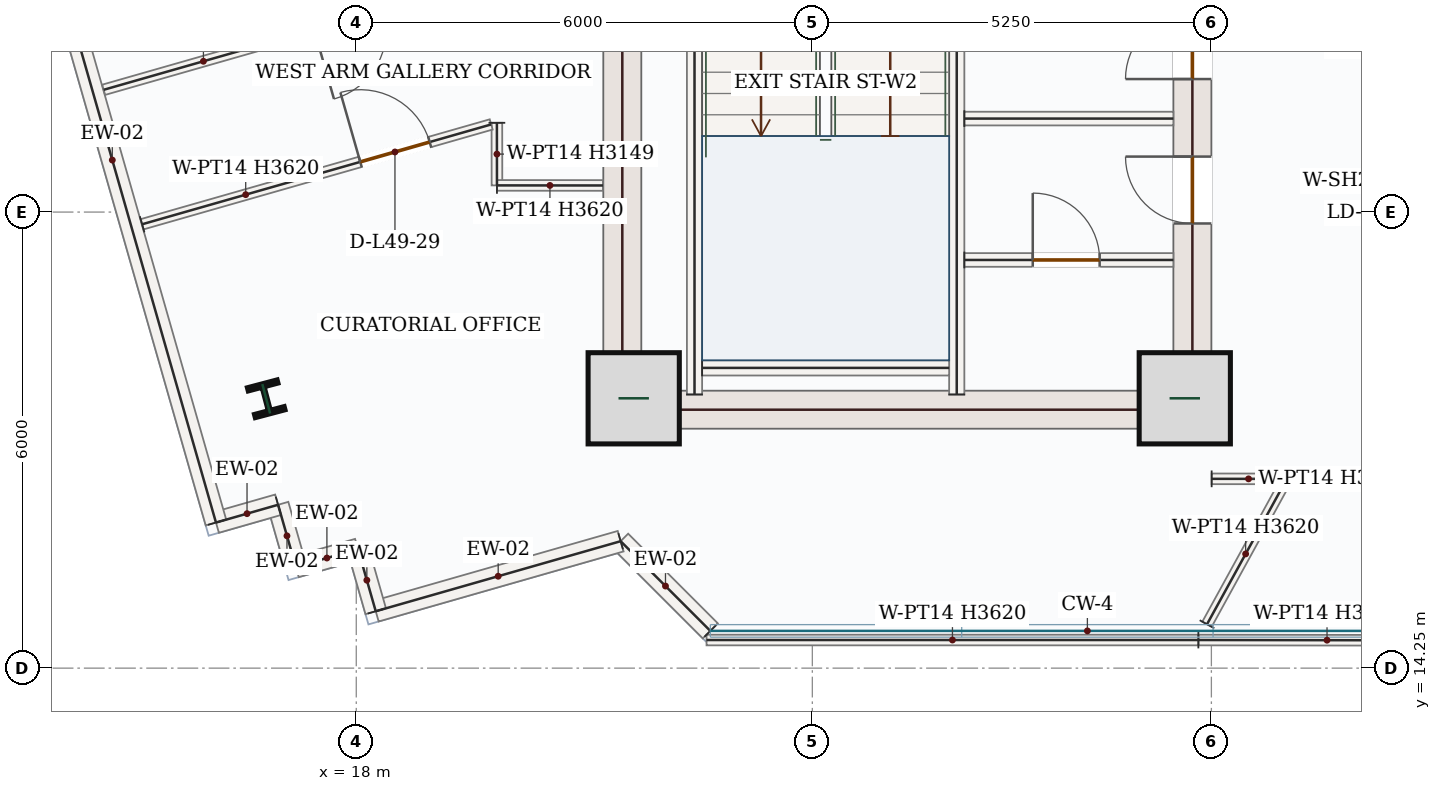
"""IFC4 building model, lengths in metres.
Left out: names, types, materials, properties, quantities, classifications, styles, units other than length and angle.
Written with IfcOpenShell. Run it as: python <this file> out.ifc"""

import sys

from ifc_helpers import new_model, si_unit, direction, frame, frame_2d, origin, origin_2d, place, context, subcontext, project, spatial, rectangle, i_section, extrude, source, transform, mapped, element, fill, save


model = new_model("IFC4")
c1 = context("Model", 3, precision=1e-05, world=origin(), true_north=direction((0.0, 1.0)))
c2 = subcontext(c1, "Body", "Model", "MODEL_VIEW")
j1 = project(units=[si_unit("LENGTHUNIT", "METRE"), si_unit("PLANEANGLEUNIT", "RADIAN")], contexts=[c1])
p1 = place(None, origin())
s1 = spatial("IfcSite", under=j1, at=p1, CompositionType="ELEMENT")
p2 = place(p1, origin())
s2 = spatial("IfcBuilding", under=s1, at=p2, CompositionType="ELEMENT")
p3 = place(p2, frame((0.0, 0.0, 209.7)))
s3 = spatial("IfcBuildingStorey", under=s2, at=p3, CompositionType="ELEMENT", Elevation=209.7)
m1 = source(origin(), c2, "Body", "SweptSolid", [
    extrude(rectangle(XDim=8.55, YDim=0.5, at=frame_2d((4.275, 0.0))), origin(), (0.0, 0.0, 1.0), 3.62),
])
p4 = place(p3, frame((21.5, 17.4, 0.0), z_axis=(0.0, 0.0, 1.0), x_axis=(0.0, 1.0, 0.0)))
e1 = element("IfcWall", 1, at=p4, inside=s3, PredefinedType="SHEAR", context=c2, shape_type="MappedRepresentation", body=[
    mapped(m1, transform((0.0, 0.0, 0.0), x_axis=(1.0, 0.0, 0.0), y_axis=(0.0, 1.0, 0.0), z_axis=(0.0, 0.0, 1.0), scale=1.0)),
])
p5 = place(p3, frame((29.0, 17.4, 0.0), z_axis=(0.0, 0.0, 1.0), x_axis=(0.0, 1.0, 0.0)))
e2 = element("IfcWall", 2, at=p5, inside=s3, PredefinedType="SHEAR", context=c2, shape_type="SweptSolid", body=[
    extrude(rectangle(XDim=8.55, YDim=0.5, at=frame_2d((4.275, 0.0))), origin(), (0.0, 0.0, 1.0), 3.62),
])
p6 = place(p5, frame((6.65, 0.0, 0.0)))
e3 = element("IfcOpeningElement", 3, at=p6, cuts=e2, PredefinedType="OPENING", context=c2, shape_type="SweptSolid", body=[
    extrude(rectangle(XDim=1.1, YDim=2.2, at=frame_2d((0.55, 1.1))), frame((0.0, 0.26, 0.0), z_axis=(0.0, -1.0, 0.0), x_axis=(1.0, 0.0, 0.0)), (0.0, 0.0, 1.0), 0.52),
])
p7 = place(p5, frame((2.7, 0.0, 0.0)))
e4 = element("IfcOpeningElement", 4, at=p7, cuts=e2, PredefinedType="OPENING", context=c2, shape_type="SweptSolid", body=[
    extrude(rectangle(XDim=0.88, YDim=2.1, at=frame_2d((0.44, 1.05))), frame((0.0, 0.26, 0.0), z_axis=(0.0, -1.0, 0.0), x_axis=(1.0, 0.0, 0.0)), (0.0, 0.0, 1.0), 0.52),
])
p8 = place(p5, frame((4.6, 0.0, 0.0)))
e5 = element("IfcOpeningElement", 5, at=p8, cuts=e2, PredefinedType="OPENING", context=c2, shape_type="SweptSolid", body=[
    extrude(rectangle(XDim=0.88, YDim=2.1, at=frame_2d((0.44, 1.05))), frame((0.0, 0.26, 0.0), z_axis=(0.0, -1.0, 0.0), x_axis=(1.0, 0.0, 0.0)), (0.0, 0.0, 1.0), 0.52),
])
m2 = source(origin(), c2, "Body", "SweptSolid", [
    extrude(rectangle(XDim=7.0, YDim=0.5, at=frame_2d((3.5, 0.0))), origin(), (0.0, 0.0, 1.0), 3.62),
])
p9 = place(p3, frame((21.75, 17.65, 0.0), z_axis=(0.0, 0.0, 1.0), x_axis=(1.0, 0.0, 0.0)))
e6 = element("IfcWall", 6, at=p9, inside=s3, PredefinedType="SHEAR", context=c2, shape_type="MappedRepresentation", body=[
    mapped(m2, transform((0.0, 0.0, 0.0), x_axis=(1.0, 0.0, 0.0), y_axis=(0.0, 1.0, 0.0), z_axis=(0.0, 0.0, 1.0), scale=1.0)),
])
m3 = source(origin(), c2, "Body", "SweptSolid", [
    extrude(rectangle(XDim=1.2, YDim=1.2, at=origin_2d()), origin(), (0.0, 0.0, 1.0), 3.9),
])
for number, where, z_axis, x_axis in (
    (7, (21.65, 17.8, 0.0), (0.0, 0.0, 1.0), (1.0, 0.0, 0.0)),
    (8, (28.9, 17.8, 0.0), (0.0, 0.0, 1.0), (1.0, 0.0, 0.0)),
):
    element("IfcColumn", number, at=place(p3, frame(where, z_axis=z_axis, x_axis=x_axis)), inside=s3, PredefinedType="COLUMN", context=c2, shape_type="MappedRepresentation", body=[
        mapped(m3, transform((0.0, 0.0, 0.0), x_axis=(1.0, 0.0, 0.0), y_axis=(0.0, 1.0, 0.0), z_axis=(0.0, 0.0, 1.0), scale=1.0)),
    ])
m4 = source(origin(), c2, "Body", "SweptSolid", [
    extrude(i_section(OverallWidth=0.404, OverallDepth=0.407, WebThickness=0.027, FlangeThickness=0.044, FilletRadius=0.018, at=origin_2d()), origin(), (0.0, 0.0, 1.0), 3.9),
])
p10 = place(p3, frame((16.815, 17.794, 0.0), z_axis=(0.0, 0.0, 1.0), x_axis=(0.966823388604, 0.255445757936, 0.0)))
e9 = element("IfcColumn", 9, at=p10, inside=s3, PredefinedType="COLUMN", context=c2, shape_type="MappedRepresentation", body=[
    mapped(m4, transform((0.0, 0.0, 0.0), x_axis=(1.0, 0.0, 0.0), y_axis=(0.0, 1.0, 0.0), z_axis=(0.0, 0.0, 1.0), scale=1.0)),
])
m5 = source(origin(), c2, "Body", "SweptSolid", [
    extrude(rectangle(XDim=1.669, YDim=0.28, at=frame_2d((0.834, 0.0))), origin(), (0.0, 0.0, 1.0), 3.62),
])
p11 = place(p3, frame((22.658, 14.74, 0.0), z_axis=(0.0, 0.0, 1.0), x_axis=(-0.707106781187, 0.707106781187, 0.0)))
e10 = element("IfcWall", 10, at=p11, inside=s3, PredefinedType="SOLIDWALL", context=c2, shape_type="MappedRepresentation", body=[
    mapped(m5, transform((0.0, 0.0, 0.0), x_axis=(1.0, 0.0, 0.0), y_axis=(0.0, 1.0, 0.0), z_axis=(0.0, 0.0, 1.0), scale=1.0)),
])
m6 = source(origin(), c2, "Body", "SweptSolid", [
    extrude(rectangle(XDim=3.351, YDim=0.28, at=frame_2d((1.676, 0.0))), origin(), (0.0, 0.0, 1.0), 3.62),
])
p12 = place(p3, frame((21.478, 15.92, 0.0), z_axis=(0.0, 0.0, 1.0), x_axis=(-0.961438677319, -0.275019398869, 0.0)))
e11 = element("IfcWall", 11, at=p12, inside=s3, PredefinedType="SOLIDWALL", context=c2, shape_type="MappedRepresentation", body=[
    mapped(m6, transform((0.0, 0.0, 0.0), x_axis=(1.0, 0.0, 0.0), y_axis=(0.0, 1.0, 0.0), z_axis=(0.0, 0.0, 1.0), scale=1.0)),
])
m7 = source(origin(), c2, "Body", "SweptSolid", [
    extrude(rectangle(XDim=0.85, YDim=0.28, at=frame_2d((0.425, 0.0))), origin(), (0.0, 0.0, 1.0), 3.62),
])
p13 = place(p3, frame((18.256, 14.998, 0.0), z_axis=(0.0, 0.0, 1.0), x_axis=(-0.275100375961, 0.961415510144, 0.0)))
e12 = element("IfcWall", 12, at=p13, inside=s3, PredefinedType="SOLIDWALL", context=c2, shape_type="MappedRepresentation", body=[
    mapped(m7, transform((0.0, 0.0, 0.0), x_axis=(1.0, 0.0, 0.0), y_axis=(0.0, 1.0, 0.0), z_axis=(0.0, 0.0, 1.0), scale=1.0)),
])
m8 = source(origin(), c2, "Body", "SweptSolid", [
    extrude(rectangle(XDim=0.85, YDim=0.28, at=frame_2d((0.425, 0.0))), origin(), (0.0, 0.0, 1.0), 3.62),
])
p14 = place(p3, frame((18.022, 15.816, 0.0), z_axis=(0.0, 0.0, 1.0), x_axis=(-0.961393768724, -0.275176346112, 0.0)))
e13 = element("IfcWall", 13, at=p14, inside=s3, PredefinedType="SOLIDWALL", context=c2, shape_type="MappedRepresentation", body=[
    mapped(m8, transform((0.0, 0.0, 0.0), x_axis=(1.0, 0.0, 0.0), y_axis=(0.0, 1.0, 0.0), z_axis=(0.0, 0.0, 1.0), scale=1.0)),
])
p15 = place(p3, frame((17.205, 15.582, 0.0), z_axis=(0.0, 0.0, 1.0), x_axis=(-0.274834915789, 0.961491429532, 0.0)))
e14 = element("IfcWall", 14, at=p15, inside=s3, PredefinedType="SOLIDWALL", context=c2, shape_type="MappedRepresentation", body=[
    mapped(m7, transform((0.0, 0.0, 0.0), x_axis=(1.0, 0.0, 0.0), y_axis=(0.0, 1.0, 0.0), z_axis=(0.0, 0.0, 1.0), scale=1.0)),
])
p16 = place(p3, frame((16.971, 16.399, 0.0), z_axis=(0.0, 0.0, 1.0), x_axis=(-0.961393768724, -0.275176346112, 0.0)))
e15 = element("IfcWall", 15, at=p16, inside=s3, PredefinedType="SOLIDWALL", context=c2, shape_type="MappedRepresentation", body=[
    mapped(m8, transform((0.0, 0.0, 0.0), x_axis=(1.0, 0.0, 0.0), y_axis=(0.0, 1.0, 0.0), z_axis=(0.0, 0.0, 1.0), scale=1.0)),
])
m9 = source(origin(), c2, "Body", "SweptSolid", [
    extrude(rectangle(XDim=9.92, YDim=0.28, at=frame_2d((4.96, 0.0))), origin(), (0.0, 0.0, 1.0), 3.62),
])
p17 = place(p3, frame((16.154, 16.165, 0.0), z_axis=(0.0, 0.0, 1.0), x_axis=(-0.274971401171, 0.961452405758, 0.0)))
e16 = element("IfcWall", 16, at=p17, inside=s3, PredefinedType="SOLIDWALL", context=c2, shape_type="MappedRepresentation", body=[
    mapped(m9, transform((0.0, 0.0, 0.0), x_axis=(1.0, 0.0, 0.0), y_axis=(0.0, 1.0, 0.0), z_axis=(0.0, 0.0, 1.0), scale=1.0)),
])
m10 = source(origin(), c2, "Body", "SweptSolid", [
    extrude(rectangle(XDim=7.87, YDim=0.2, at=frame_2d((3.935, 0.0))), origin(), (0.0, 0.0, 1.0), 3.62),
])
p18 = place(p3, frame((22.45, 17.85, 0.0), z_axis=(0.0, 0.0, 1.0), x_axis=(0.0, 1.0, 0.0)))
e17 = element("IfcWall", 17, at=p18, inside=s3, PredefinedType="SOLIDWALL", context=c2, shape_type="MappedRepresentation", body=[
    mapped(m10, transform((0.0, 0.0, 0.0), x_axis=(1.0, 0.0, 0.0), y_axis=(0.0, 1.0, 0.0), z_axis=(0.0, 0.0, 1.0), scale=1.0)),
])
p19 = place(p3, frame((25.9, 17.85, 0.0), z_axis=(0.0, 0.0, 1.0), x_axis=(0.0, 1.0, 0.0)))
e18 = element("IfcWall", 18, at=p19, inside=s3, PredefinedType="SOLIDWALL", context=c2, shape_type="SweptSolid", body=[
    extrude(rectangle(XDim=8.0, YDim=0.2, at=frame_2d((4.0, 0.0))), origin(), (0.0, 0.0, 1.0), 3.62),
])
p20 = place(p19, frame((6.3, 0.0, 0.0)))
e19 = element("IfcOpeningElement", 19, at=p20, cuts=e18, PredefinedType="OPENING", context=c2, shape_type="SweptSolid", body=[
    extrude(rectangle(XDim=1.05, YDim=2.15, at=frame_2d((0.525, 1.075))), frame((0.0, 0.11, 0.0), z_axis=(0.0, -1.0, 0.0), x_axis=(1.0, 0.0, 0.0)), (0.0, 0.0, 1.0), 0.22),
])
m11 = source(origin(), c2, "Body", "SweptSolid", [
    extrude(rectangle(XDim=3.25, YDim=0.2, at=frame_2d((1.625, 0.0))), origin(), (0.0, 0.0, 1.0), 3.62),
])
p21 = place(p3, frame((22.55, 18.2, 0.0), z_axis=(0.0, 0.0, 1.0), x_axis=(1.0, 0.0, 0.0)))
e20 = element("IfcWall", 20, at=p21, inside=s3, PredefinedType="SOLIDWALL", context=c2, shape_type="MappedRepresentation", body=[
    mapped(m11, transform((0.0, 0.0, 0.0), x_axis=(1.0, 0.0, 0.0), y_axis=(0.0, 1.0, 0.0), z_axis=(0.0, 0.0, 1.0), scale=1.0)),
])
p22 = place(p3, frame((26.0, 19.62, 0.0), z_axis=(0.0, 0.0, 1.0), x_axis=(1.0, 0.0, 0.0)))
e21 = element("IfcWall", 21, at=p22, inside=s3, PredefinedType="PARTITIONING", context=c2, shape_type="SweptSolid", body=[
    extrude(rectangle(XDim=2.75, YDim=0.18, at=frame_2d((1.375, 0.0))), origin(), (0.0, 0.0, 1.0), 3.62),
])
p23 = place(p22, frame((0.9, 0.0, 0.0)))
e22 = element("IfcOpeningElement", 22, at=p23, cuts=e21, PredefinedType="OPENING", context=c2, shape_type="SweptSolid", body=[
    extrude(rectangle(XDim=0.88, YDim=2.1, at=frame_2d((0.44, 1.05))), frame((0.0, 0.1, 0.0), z_axis=(0.0, -1.0, 0.0), x_axis=(1.0, 0.0, 0.0)), (0.0, 0.0, 1.0), 0.2),
])
m12 = source(origin(), c2, "Body", "SweptSolid", [
    extrude(rectangle(XDim=2.75, YDim=0.18, at=frame_2d((1.375, 0.0))), origin(), (0.0, 0.0, 1.0), 3.62),
])
p24 = place(p3, frame((26.0, 21.48, 0.0), z_axis=(0.0, 0.0, 1.0), x_axis=(1.0, 0.0, 0.0)))
e23 = element("IfcWall", 23, at=p24, inside=s3, PredefinedType="PARTITIONING", context=c2, shape_type="MappedRepresentation", body=[
    mapped(m12, transform((0.0, 0.0, 0.0), x_axis=(1.0, 0.0, 0.0), y_axis=(0.0, 1.0, 0.0), z_axis=(0.0, 0.0, 1.0), scale=1.0)),
])
p25 = place(p3, frame((30.225, 16.74, 0.0), z_axis=(0.0, 0.0, 1.0), x_axis=(1.0, 0.0, 0.0)))
e24 = element("IfcWall", 24, at=p25, inside=s3, PredefinedType="PARTITIONING", context=c2, shape_type="SweptSolid", body=[
    extrude(rectangle(XDim=7.753, YDim=0.14, at=frame_2d((3.876, 0.0))), origin(), (0.0, 0.0, 1.0), 3.62),
])
p26 = place(p25, frame((5.306, 0.0, 0.0)))
e25 = element("IfcOpeningElement", 25, at=p26, cuts=e24, PredefinedType="OPENING", context=c2, shape_type="SweptSolid", body=[
    extrude(rectangle(XDim=0.95, YDim=2.15, at=frame_2d((0.475, 1.075))), frame((0.0, 0.08, 0.0), z_axis=(0.0, -1.0, 0.0), x_axis=(1.0, 0.0, 0.0)), (0.0, 0.0, 1.0), 0.16),
])
m13 = source(origin(), c2, "Body", "SweptSolid", [
    extrude(rectangle(XDim=3.385, YDim=0.14, at=frame_2d((1.693, 0.0))), origin(), (0.0, 0.0, 1.0), 3.62),
])
p27 = place(p3, frame((32.464, 14.615, 0.0), z_axis=(0.0, 0.0, 1.0), x_axis=(-0.999999061333, 0.001370158085, 0.0)))
e26 = element("IfcWall", 26, at=p27, inside=s3, PredefinedType="PARTITIONING", context=c2, shape_type="MappedRepresentation", body=[
    mapped(m13, transform((0.0, 0.0, 0.0), x_axis=(1.0, 0.0, 0.0), y_axis=(0.0, 1.0, 0.0), z_axis=(0.0, 0.0, 1.0), scale=1.0)),
])
m14 = source(origin(), c2, "Body", "SweptSolid", [
    extrude(rectangle(XDim=2.111, YDim=0.14, at=frame_2d((1.056, 0.0))), origin(), (0.0, 0.0, 1.0), 3.62),
])
p28 = place(p3, frame((29.193, 14.827, 0.0), z_axis=(0.0, 0.0, 1.0), x_axis=(0.481297142313, 0.876557505702, 0.0)))
e27 = element("IfcWall", 27, at=p28, inside=s3, PredefinedType="PARTITIONING", context=c2, shape_type="MappedRepresentation", body=[
    mapped(m14, transform((0.0, 0.0, 0.0), x_axis=(1.0, 0.0, 0.0), y_axis=(0.0, 1.0, 0.0), z_axis=(0.0, 0.0, 1.0), scale=1.0)),
])
p29 = place(p3, frame((19.85, 23.338, 0.0), z_axis=(0.0, 0.0, 1.0), x_axis=(-0.961455430103, -0.274960826164, 0.0)))
e28 = element("IfcWall", 28, at=p29, inside=s3, PredefinedType="PARTITIONING", context=c2, shape_type="SweptSolid", body=[
    extrude(rectangle(XDim=5.381, YDim=0.14, at=frame_2d((2.69, 0.0))), origin(), (0.0, 0.0, 1.0), 3.62),
])
p30 = place(p29, frame((1.551, 0.0, 0.0)))
e29 = element("IfcOpeningElement", 29, at=p30, cuts=e28, PredefinedType="OPENING", context=c2, shape_type="SweptSolid", body=[
    extrude(rectangle(XDim=0.95, YDim=2.15, at=frame_2d((0.475, 1.075))), frame((0.0, 0.08, 0.0), z_axis=(0.0, -1.0, 0.0), x_axis=(1.0, 0.0, 0.0)), (0.0, 0.0, 1.0), 0.16),
])
m15 = source(origin(), c2, "Body", "SweptSolid", [
    extrude(rectangle(XDim=0.823, YDim=0.14, at=frame_2d((0.412, 0.0))), origin(), (0.0, 0.0, 1.0), 3.149),
])
p31 = place(p3, frame((19.85, 21.424, 0.0), z_axis=(0.0, 0.0, 1.0), x_axis=(0.001186238786, -0.999999296419, 0.0)))
e30 = element("IfcWall", 30, at=p31, inside=s3, PredefinedType="PARTITIONING", context=c2, shape_type="MappedRepresentation", body=[
    mapped(m15, transform((0.0, 0.0, 0.0), x_axis=(1.0, 0.0, 0.0), y_axis=(0.0, 1.0, 0.0), z_axis=(0.0, 0.0, 1.0), scale=1.0)),
])
m16 = source(origin(), c2, "Body", "SweptSolid", [
    extrude(rectangle(XDim=1.394, YDim=0.14, at=frame_2d((0.697, 0.0))), origin(), (0.0, 0.0, 1.0), 3.62),
])
p32 = place(p3, frame((19.851, 20.601, 0.0), z_axis=(0.0, 0.0, 1.0), x_axis=(0.999999754632, -0.000700525222, 0.0)))
e31 = element("IfcWall", 31, at=p32, inside=s3, PredefinedType="PARTITIONING", context=c2, shape_type="MappedRepresentation", body=[
    mapped(m16, transform((0.0, 0.0, 0.0), x_axis=(1.0, 0.0, 0.0), y_axis=(0.0, 1.0, 0.0), z_axis=(0.0, 0.0, 1.0), scale=1.0)),
])
m17 = source(origin(), c2, "Body", "SweptSolid", [
    extrude(rectangle(XDim=0.971, YDim=0.14, at=frame_2d((0.486, 0.0))), origin(), (0.0, 0.0, 1.0), 3.62),
])
p33 = place(p3, frame((29.253, 16.74, 0.0), z_axis=(0.0, 0.0, 1.0), x_axis=(0.999999873614, -0.000502765145, 0.0)))
e32 = element("IfcWall", 32, at=p33, inside=s3, PredefinedType="PARTITIONING", context=c2, shape_type="MappedRepresentation", body=[
    mapped(m17, transform((0.0, 0.0, 0.0), x_axis=(1.0, 0.0, 0.0), y_axis=(0.0, 1.0, 0.0), z_axis=(0.0, 0.0, 1.0), scale=1.0)),
])
m18 = source(origin(), c2, "Body", "SweptSolid", [
    extrude(rectangle(XDim=6.47, YDim=0.14, at=frame_2d((3.235, 0.0))), origin(), (0.0, 0.0, 1.0), 3.62),
])
p34 = place(p3, frame((29.079, 14.62, 0.0), z_axis=(0.0, 0.0, 1.0), x_axis=(-1.0, 0.0, 0.0)))
e33 = element("IfcWall", 33, at=p34, inside=s3, PredefinedType="PARTITIONING", context=c2, shape_type="MappedRepresentation", body=[
    mapped(m18, transform((0.0, 0.0, 0.0), x_axis=(1.0, 0.0, 0.0), y_axis=(0.0, 1.0, 0.0), z_axis=(0.0, 0.0, 1.0), scale=1.0)),
])
p35 = place(p3, frame((15.183, 20.09, 0.0), z_axis=(0.0, 0.0, 1.0), x_axis=(0.961460270043, 0.274943901784, 0.0)))
e34 = element("IfcWall", 34, at=p35, inside=s3, PredefinedType="PARTITIONING", context=c2, shape_type="SweptSolid", body=[
    extrude(rectangle(XDim=4.776, YDim=0.14, at=frame_2d((2.388, 0.0))), origin(), (0.0, 0.0, 1.0), 3.62),
])
p36 = place(p35, frame((2.985, 0.0, 0.0)))
e35 = element("IfcOpeningElement", 35, at=p36, cuts=e34, PredefinedType="OPENING", context=c2, shape_type="SweptSolid", body=[
    extrude(rectangle(XDim=0.95, YDim=2.15, at=frame_2d((0.475, 1.075))), frame((0.0, 0.08, 0.0), z_axis=(0.0, -1.0, 0.0), x_axis=(1.0, 0.0, 0.0)), (0.0, 0.0, 1.0), 0.16),
])
m19 = source(origin(), c2, "Body", "SweptSolid", [
    extrude(rectangle(XDim=0.88, YDim=2.1, at=frame_2d((0.44, 1.05))), frame((0.0, 0.025, 0.0), z_axis=(0.0, -1.0, 0.0), x_axis=(1.0, 0.0, 0.0)), (0.0, 0.0, 1.0), 0.05),
])
p37 = place(p23, origin())
e36 = element("IfcDoor", 36, at=p37, inside=s3, OperationType="SINGLE_SWING_LEFT", PredefinedType="DOOR", context=c2, shape_type="MappedRepresentation", body=[
    mapped(m19, transform((0.0, 0.0, 0.0), x_axis=(1.0, 0.0, 0.0), y_axis=(0.0, 1.0, 0.0), z_axis=(0.0, 0.0, 1.0), scale=1.0)),
])
fill(e22, e36)
p38 = place(p7, origin())
e37 = element("IfcDoor", 37, at=p38, inside=s3, OperationType="SINGLE_SWING_RIGHT", PredefinedType="DOOR", context=c2, shape_type="MappedRepresentation", body=[
    mapped(m19, transform((0.0, 0.0, 0.0), x_axis=(1.0, 0.0, 0.0), y_axis=(0.0, 1.0, 0.0), z_axis=(0.0, 0.0, 1.0), scale=1.0)),
])
fill(e4, e37)
p39 = place(p8, origin())
e38 = element("IfcDoor", 38, at=p39, inside=s3, OperationType="SINGLE_SWING_LEFT", PredefinedType="DOOR", context=c2, shape_type="MappedRepresentation", body=[
    mapped(m19, transform((0.0, 0.0, 0.0), x_axis=(1.0, 0.0, 0.0), y_axis=(0.0, 1.0, 0.0), z_axis=(0.0, 0.0, 1.0), scale=1.0)),
])
fill(e5, e38)
m20 = source(origin(), c2, "Body", "SweptSolid", [
    extrude(rectangle(XDim=0.95, YDim=2.15, at=frame_2d((0.475, 1.075))), frame((0.0, 0.025, 0.0), z_axis=(0.0, -1.0, 0.0), x_axis=(1.0, 0.0, 0.0)), (0.0, 0.0, 1.0), 0.05),
])
p40 = place(p36, origin())
e39 = element("IfcDoor", 39, at=p40, inside=s3, OperationType="SINGLE_SWING_LEFT", PredefinedType="DOOR", context=c2, shape_type="MappedRepresentation", body=[
    mapped(m20, transform((0.0, 0.0, 0.0), x_axis=(1.0, 0.0, 0.0), y_axis=(0.0, 1.0, 0.0), z_axis=(0.0, 0.0, 1.0), scale=1.0)),
])
fill(e35, e39)
save(model, sys.argv[1])
